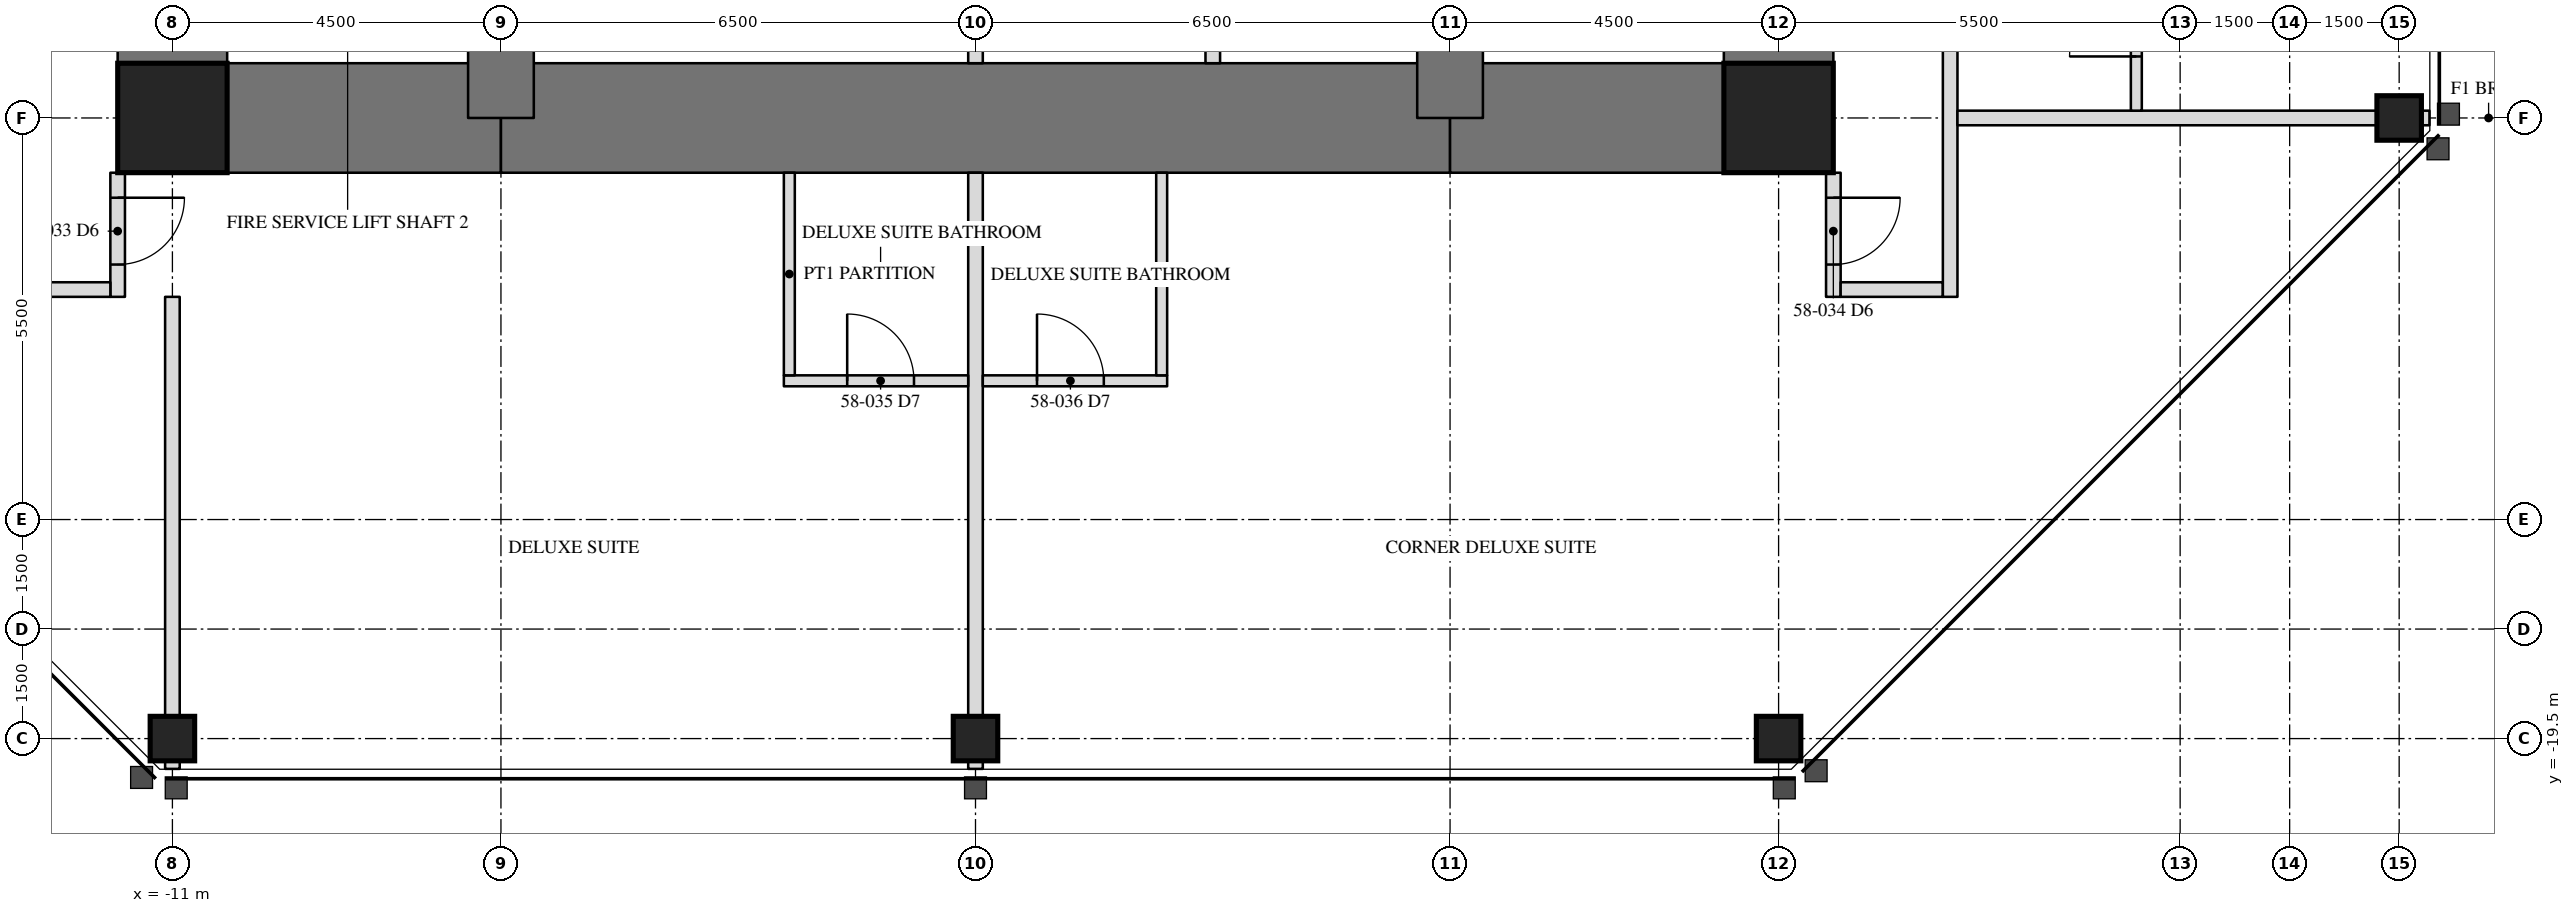
"""IFC4 building model, lengths in metres.
Left out: names, types, materials, properties, quantities, classifications, styles, units other than length and angle.
Written with IfcOpenShell. Run it as: python <this file> out.ifc"""

import sys

from ifc_helpers import new_model, si_unit, direction, frame, frame_2d, origin, origin_2d, place, context, subcontext, project, spatial, rectangle, hollow_rectangle, extrude, element, fill, save


model = new_model("IFC4")
c1 = context("Model", 3, precision=1e-05, world=origin(), true_north=direction((0.0, 1.0)))
c2 = subcontext(c1, "Body", "Model", "MODEL_VIEW")
j1 = project(units=[si_unit("LENGTHUNIT", "METRE"), si_unit("PLANEANGLEUNIT", "RADIAN")], contexts=[c1])
p1 = place(None, origin())
s1 = spatial("IfcSite", under=j1, at=p1, CompositionType="ELEMENT")
p2 = place(p1, origin())
s2 = spatial("IfcBuilding", under=s1, at=p2, CompositionType="ELEMENT")
p3 = place(p2, frame((0.0, 0.0, 239.7)))
s3 = spatial("IfcBuildingStorey", under=s2, at=p3, CompositionType="ELEMENT", Elevation=239.7)
for number, where, z_axis, x_axis in (
    (1, (-11.0, -19.5, 0.0), (0.0, 0.0, 1.0), (1.0, 0.0, 0.0)),
    (2, (0.0, -19.5, 0.0), (0.0, 0.0, 1.0), (1.0, 0.0, 0.0)),
    (3, (11.0, -19.5, 0.0), (0.0, 0.0, 1.0), (1.0, 0.0, 0.0)),
    (4, (19.5, -11.0, 0.0), (0.0, 0.0, 1.0), (0.0, 1.0, 0.0)),
):
    element("IfcColumn", number, at=place(p3, frame(where, z_axis=z_axis, x_axis=x_axis)), inside=s3, PredefinedType="COLUMN", context=c2, shape_type="SweptSolid", body=[
        extrude(hollow_rectangle(XDim=0.61, YDim=0.61, WallThickness=0.051, at=origin_2d()), origin(), (0.0, 0.0, 1.0), 3.5),
    ])
p4 = place(p3, frame((11.0, -11.0, 0.0), z_axis=(0.0, 0.0, 1.0), x_axis=(0.0, 1.0, 0.0)))
e5 = element("IfcWall", 5, at=p4, inside=s3, PredefinedType="SHEAR", context=c2, shape_type="SweptSolid", body=[
    extrude(rectangle(XDim=22.0, YDim=1.5, at=frame_2d((11.0, 0.0))), origin(), (0.0, 0.0, 1.0), 3.5),
])
p5 = place(p4, frame((15.393, 0.0, 0.0)))
e6 = element("IfcOpeningElement", 6, at=p5, cuts=e5, PredefinedType="OPENING", context=c2, shape_type="SweptSolid", body=[
    extrude(rectangle(XDim=0.915, YDim=2.134, at=frame_2d((0.458, 1.067))), frame((0.0, 0.76, 0.0), z_axis=(0.0, -1.0, 0.0), x_axis=(1.0, 0.0, 0.0)), (0.0, 0.0, 1.0), 1.52),
])
p6 = place(p3, frame((-11.0, 11.0, 0.0), z_axis=(0.0, 0.0, 1.0), x_axis=(0.0, -1.0, 0.0)))
e7 = element("IfcWall", 7, at=p6, inside=s3, PredefinedType="SHEAR", context=c2, shape_type="SweptSolid", body=[
    extrude(rectangle(XDim=22.0, YDim=1.5, at=frame_2d((11.0, 0.0))), origin(), (0.0, 0.0, 1.0), 3.5),
])
p7 = place(p6, frame((15.393, 0.0, 0.0)))
e8 = element("IfcOpeningElement", 8, at=p7, cuts=e7, PredefinedType="OPENING", context=c2, shape_type="SweptSolid", body=[
    extrude(rectangle(XDim=0.915, YDim=2.134, at=frame_2d((0.458, 1.067))), frame((0.0, 0.76, 0.0), z_axis=(0.0, -1.0, 0.0), x_axis=(1.0, 0.0, 0.0)), (0.0, 0.0, 1.0), 1.52),
])
p8 = place(p3, frame((-11.0, -11.0, 0.0), z_axis=(0.0, 0.0, 1.0), x_axis=(1.0, 0.0, 0.0)))
e9 = element("IfcWall", 9, at=p8, inside=s3, PredefinedType="SHEAR", context=c2, shape_type="SweptSolid", body=[
    extrude(rectangle(XDim=4.5, YDim=1.5, at=frame_2d((2.25, 0.0))), origin(), (0.0, 0.0, 1.0), 3.5),
])
p9 = place(p3, frame((-6.5, -11.0, 0.0), z_axis=(0.0, 0.0, 1.0), x_axis=(1.0, 0.0, 0.0)))
e10 = element("IfcWall", 10, at=p9, inside=s3, PredefinedType="SHEAR", context=c2, shape_type="SweptSolid", body=[
    extrude(rectangle(XDim=13.0, YDim=1.5, at=frame_2d((6.5, 0.0))), origin(), (0.0, 0.0, 1.0), 3.5),
])
p10 = place(p3, frame((6.5, -11.0, 0.0), z_axis=(0.0, 0.0, 1.0), x_axis=(1.0, 0.0, 0.0)))
e11 = element("IfcWall", 11, at=p10, inside=s3, PredefinedType="SHEAR", context=c2, shape_type="SweptSolid", body=[
    extrude(rectangle(XDim=4.5, YDim=1.5, at=frame_2d((2.25, 0.0))), origin(), (0.0, 0.0, 1.0), 3.5),
])
for number, where, z_axis, x_axis in (
    (12, (6.5, -11.0, 0.0), (0.0, 0.0, 1.0), (0.0, 1.0, 0.0)),
    (13, (-6.5, -6.5, 0.0), (0.0, 0.0, 1.0), (0.0, -1.0, 0.0)),
):
    element("IfcWall", number, at=place(p3, frame(where, z_axis=z_axis, x_axis=x_axis)), inside=s3, PredefinedType="SHEAR", context=c2, shape_type="SweptSolid", body=[
        extrude(rectangle(XDim=4.5, YDim=0.9, at=frame_2d((2.25, 0.0))), origin(), (0.0, 0.0, 1.0), 3.5),
    ])
for number, where, z_axis, x_axis in (
    (14, (-11.0, -11.0, 0.0), (0.0, 0.0, 1.0), (1.0, 0.0, 0.0)),
    (15, (11.0, -11.0, 0.0), (0.0, 0.0, 1.0), (1.0, 0.0, 0.0)),
):
    element("IfcColumn", number, at=place(p3, frame(where, z_axis=z_axis, x_axis=x_axis)), inside=s3, PredefinedType="COLUMN", context=c2, shape_type="SweptSolid", body=[
        extrude(hollow_rectangle(XDim=1.499, YDim=1.499, WallThickness=0.102, at=origin_2d()), origin(), (0.0, 0.0, 1.0), 3.5),
    ])
for number, where, z_axis, x_axis in (
    (16, (0.0, -10.25, 0.0), (0.0, 0.0, 1.0), (0.0, 1.0, 0.0)),
    (17, (3.25, -10.25, 0.0), (0.0, 0.0, 1.0), (0.0, 1.0, 0.0)),
):
    element("IfcWall", number, at=place(p3, frame(where, z_axis=z_axis, x_axis=x_axis)), inside=s3, PredefinedType="PARTITIONING", context=c2, shape_type="SweptSolid", body=[
        extrude(rectangle(XDim=3.3, YDim=0.2, at=frame_2d((1.65, 0.0))), origin(), (0.0, 0.0, 1.0), 3.31),
    ])
p11 = place(p3, frame((-11.75, -11.75, 0.0), z_axis=(0.0, 0.0, 1.0), x_axis=(0.0, -1.0, 0.0)))
e18 = element("IfcWall", 18, at=p11, inside=s3, PredefinedType="PARTITIONING", context=c2, shape_type="SweptSolid", body=[
    extrude(rectangle(XDim=1.7, YDim=0.2, at=frame_2d((0.85, 0.0))), origin(), (0.0, 0.0, 1.0), 3.31),
])
p12 = place(p11, frame((0.343, 0.0, 0.0)))
e19 = element("IfcOpeningElement", 19, at=p12, cuts=e18, PredefinedType="OPENING", context=c2, shape_type="SweptSolid", body=[
    extrude(rectangle(XDim=0.915, YDim=2.134, at=frame_2d((0.458, 1.067))), frame((0.0, 0.11, 0.0), z_axis=(0.0, -1.0, 0.0), x_axis=(1.0, 0.0, 0.0)), (0.0, 0.0, 1.0), 0.22),
])
p13 = place(p3, frame((11.75, -11.75, 0.0), z_axis=(0.0, 0.0, 1.0), x_axis=(0.0, -1.0, 0.0)))
e20 = element("IfcWall", 20, at=p13, inside=s3, PredefinedType="PARTITIONING", context=c2, shape_type="SweptSolid", body=[
    extrude(rectangle(XDim=1.7, YDim=0.2, at=frame_2d((0.85, 0.0))), origin(), (0.0, 0.0, 1.0), 3.31),
])
p14 = place(p13, frame((0.343, 0.0, 0.0)))
e21 = element("IfcOpeningElement", 21, at=p14, cuts=e20, PredefinedType="OPENING", context=c2, shape_type="SweptSolid", body=[
    extrude(rectangle(XDim=0.915, YDim=2.134, at=frame_2d((0.458, 1.067))), frame((0.0, 0.11, 0.0), z_axis=(0.0, -1.0, 0.0), x_axis=(1.0, 0.0, 0.0)), (0.0, 0.0, 1.0), 0.22),
])
p15 = place(p3, frame((-13.45, -13.35, 0.0), z_axis=(0.0, 0.0, 1.0), x_axis=(1.0, 0.0, 0.0)))
e22 = element("IfcWall", 22, at=p15, inside=s3, PredefinedType="PARTITIONING", context=c2, shape_type="SweptSolid", body=[
    extrude(rectangle(XDim=1.6, YDim=0.2, at=frame_2d((0.8, 0.0))), origin(), (0.0, 0.0, 1.0), 3.31),
])
p16 = place(p3, frame((11.85, -13.35, 0.0), z_axis=(0.0, 0.0, 1.0), x_axis=(1.0, 0.0, 0.0)))
e23 = element("IfcWall", 23, at=p16, inside=s3, PredefinedType="PARTITIONING", context=c2, shape_type="SweptSolid", body=[
    extrude(rectangle(XDim=1.4, YDim=0.2, at=frame_2d((0.7, 0.0))), origin(), (0.0, 0.0, 1.0), 3.31),
])
p17 = place(p3, frame((13.35, -13.45, 0.0), z_axis=(0.0, 0.0, 1.0), x_axis=(0.0, 1.0, 0.0)))
e24 = element("IfcWall", 24, at=p17, inside=s3, PredefinedType="PARTITIONING", context=c2, shape_type="SweptSolid", body=[
    extrude(rectangle(XDim=27.5, YDim=0.2, at=frame_2d((13.75, 0.0))), origin(), (0.0, 0.0, 1.0), 3.31),
])
p18 = place(p17, frame((5.353, 0.0, 0.0)))
e25 = element("IfcOpeningElement", 25, at=p18, cuts=e24, PredefinedType="OPENING", context=c2, shape_type="SweptSolid", body=[
    extrude(rectangle(XDim=0.915, YDim=2.134, at=frame_2d((0.458, 1.067))), frame((0.0, 0.11, 0.0), z_axis=(0.0, -1.0, 0.0), x_axis=(1.0, 0.0, 0.0)), (0.0, 0.0, 1.0), 0.22),
])
p19 = place(p17, frame((13.577, 0.0, 0.0)))
e26 = element("IfcOpeningElement", 26, at=p19, cuts=e24, PredefinedType="OPENING", context=c2, shape_type="SweptSolid", body=[
    extrude(rectangle(XDim=0.915, YDim=2.134, at=frame_2d((0.458, 1.067))), frame((0.0, 0.11, 0.0), z_axis=(0.0, -1.0, 0.0), x_axis=(1.0, 0.0, 0.0)), (0.0, 0.0, 1.0), 0.22),
])
p20 = place(p17, frame((21.967, 0.0, 0.0)))
e27 = element("IfcOpeningElement", 27, at=p20, cuts=e24, PredefinedType="OPENING", context=c2, shape_type="SweptSolid", body=[
    extrude(rectangle(XDim=0.915, YDim=2.134, at=frame_2d((0.458, 1.067))), frame((0.0, 0.11, 0.0), z_axis=(0.0, -1.0, 0.0), x_axis=(1.0, 0.0, 0.0)), (0.0, 0.0, 1.0), 0.22),
])
p21 = place(p3, frame((13.45, -11.0, 0.0), z_axis=(0.0, 0.0, 1.0), x_axis=(1.0, 0.0, 0.0)))
e28 = element("IfcWall", 28, at=p21, inside=s3, PredefinedType="PARTITIONING", context=c2, shape_type="SweptSolid", body=[
    extrude(rectangle(XDim=6.465, YDim=0.2, at=frame_2d((3.232, 0.0))), origin(), (0.0, 0.0, 1.0), 2.802),
])
p22 = place(p3, frame((15.9, -10.9, 0.0), z_axis=(0.0, 0.0, 1.0), x_axis=(0.0, 1.0, 0.0)))
e29 = element("IfcWall", 29, at=p22, inside=s3, PredefinedType="PARTITIONING", context=c2, shape_type="SweptSolid", body=[
    extrude(rectangle(XDim=2.525, YDim=0.15, at=frame_2d((1.262, 0.0))), origin(), (0.0, 0.0, 1.0), 3.31),
])
p23 = place(p22, frame((0.742, 0.0, 0.0)))
e30 = element("IfcOpeningElement", 30, at=p23, cuts=e29, PredefinedType="OPENING", context=c2, shape_type="SweptSolid", body=[
    extrude(rectangle(XDim=0.915, YDim=2.032, at=frame_2d((0.458, 1.016))), frame((0.0, 0.085, 0.0), z_axis=(0.0, -1.0, 0.0), x_axis=(1.0, 0.0, 0.0)), (0.0, 0.0, 1.0), 0.17),
])
p24 = place(p3, frame((-11.0, -13.45, 0.0), z_axis=(0.0, 0.0, 1.0), x_axis=(0.0, -1.0, 0.0)))
e31 = element("IfcWall", 31, at=p24, inside=s3, PredefinedType="PARTITIONING", context=c2, shape_type="SweptSolid", body=[
    extrude(rectangle(XDim=6.465, YDim=0.2, at=frame_2d((3.232, 0.0))), origin(), (0.0, 0.0, 1.0), 2.802),
])
p25 = place(p3, frame((0.0, -11.75, 0.0), z_axis=(0.0, 0.0, 1.0), x_axis=(0.0, -1.0, 0.0)))
e32 = element("IfcWall", 32, at=p25, inside=s3, PredefinedType="PARTITIONING", context=c2, shape_type="SweptSolid", body=[
    extrude(rectangle(XDim=8.165, YDim=0.2, at=frame_2d((4.083, 0.0))), origin(), (0.0, 0.0, 1.0), 2.802),
])
p26 = place(p3, frame((-2.625, -14.6, 0.0), z_axis=(0.0, 0.0, 1.0), x_axis=(1.0, 0.0, 0.0)))
e33 = element("IfcWall", 33, at=p26, inside=s3, PredefinedType="PARTITIONING", context=c2, shape_type="SweptSolid", body=[
    extrude(rectangle(XDim=2.525, YDim=0.15, at=frame_2d((1.262, 0.0))), origin(), (0.0, 0.0, 1.0), 3.31),
])
p27 = place(p26, frame((0.867, 0.0, 0.0)))
e34 = element("IfcOpeningElement", 34, at=p27, cuts=e33, PredefinedType="OPENING", context=c2, shape_type="SweptSolid", body=[
    extrude(rectangle(XDim=0.915, YDim=2.032, at=frame_2d((0.458, 1.016))), frame((0.0, 0.085, 0.0), z_axis=(0.0, -1.0, 0.0), x_axis=(1.0, 0.0, 0.0)), (0.0, 0.0, 1.0), 0.17),
])
p28 = place(p3, frame((-2.55, -11.75, 0.0), z_axis=(0.0, 0.0, 1.0), x_axis=(0.0, -1.0, 0.0)))
e35 = element("IfcWall", 35, at=p28, inside=s3, PredefinedType="PARTITIONING", context=c2, shape_type="SweptSolid", body=[
    extrude(rectangle(XDim=2.775, YDim=0.15, at=frame_2d((1.387, 0.0))), origin(), (0.0, 0.0, 1.0), 3.31),
])
p29 = place(p3, frame((0.1, -14.6, 0.0), z_axis=(0.0, 0.0, 1.0), x_axis=(1.0, 0.0, 0.0)))
e36 = element("IfcWall", 36, at=p29, inside=s3, PredefinedType="PARTITIONING", context=c2, shape_type="SweptSolid", body=[
    extrude(rectangle(XDim=2.525, YDim=0.15, at=frame_2d((1.262, 0.0))), origin(), (0.0, 0.0, 1.0), 3.31),
])
p30 = place(p29, frame((0.742, 0.0, 0.0)))
e37 = element("IfcOpeningElement", 37, at=p30, cuts=e36, PredefinedType="OPENING", context=c2, shape_type="SweptSolid", body=[
    extrude(rectangle(XDim=0.915, YDim=2.032, at=frame_2d((0.458, 1.016))), frame((0.0, 0.085, 0.0), z_axis=(0.0, -1.0, 0.0), x_axis=(1.0, 0.0, 0.0)), (0.0, 0.0, 1.0), 0.17),
])
p31 = place(p3, frame((2.55, -11.75, 0.0), z_axis=(0.0, 0.0, 1.0), x_axis=(0.0, -1.0, 0.0)))
e38 = element("IfcWall", 38, at=p31, inside=s3, PredefinedType="PARTITIONING", context=c2, shape_type="SweptSolid", body=[
    extrude(rectangle(XDim=2.775, YDim=0.15, at=frame_2d((1.387, 0.0))), origin(), (0.0, 0.0, 1.0), 3.31),
])
p32 = place(p23, origin())
e39 = element("IfcDoor", 39, at=p32, inside=s3, OperationType="SINGLE_SWING_LEFT", PredefinedType="DOOR", context=c2, shape_type="SweptSolid", body=[
    extrude(rectangle(XDim=0.915, YDim=2.032, at=frame_2d((0.458, 1.016))), frame((0.0, 0.025, 0.0), z_axis=(0.0, -1.0, 0.0), x_axis=(1.0, 0.0, 0.0)), (0.0, 0.0, 1.0), 0.05),
])
fill(e30, e39)
p33 = place(p12, origin())
e40 = element("IfcDoor", 40, at=p33, inside=s3, OperationType="SINGLE_SWING_LEFT", PredefinedType="DOOR", context=c2, shape_type="SweptSolid", body=[
    extrude(rectangle(XDim=0.915, YDim=2.134, at=frame_2d((0.458, 1.067))), frame((0.0, 0.025, 0.0), z_axis=(0.0, -1.0, 0.0), x_axis=(1.0, 0.0, 0.0)), (0.0, 0.0, 1.0), 0.05),
])
fill(e19, e40)
p34 = place(p14, origin())
e41 = element("IfcDoor", 41, at=p34, inside=s3, OperationType="SINGLE_SWING_LEFT", PredefinedType="DOOR", context=c2, shape_type="SweptSolid", body=[
    extrude(rectangle(XDim=0.915, YDim=2.134, at=frame_2d((0.458, 1.067))), frame((0.0, 0.025, 0.0), z_axis=(0.0, -1.0, 0.0), x_axis=(1.0, 0.0, 0.0)), (0.0, 0.0, 1.0), 0.05),
])
fill(e21, e41)
p35 = place(p27, origin())
e42 = element("IfcDoor", 42, at=p35, inside=s3, OperationType="SINGLE_SWING_LEFT", PredefinedType="DOOR", context=c2, shape_type="SweptSolid", body=[
    extrude(rectangle(XDim=0.915, YDim=2.032, at=frame_2d((0.458, 1.016))), frame((0.0, 0.025, 0.0), z_axis=(0.0, -1.0, 0.0), x_axis=(1.0, 0.0, 0.0)), (0.0, 0.0, 1.0), 0.05),
])
fill(e34, e42)
p36 = place(p30, origin())
e43 = element("IfcDoor", 43, at=p36, inside=s3, OperationType="SINGLE_SWING_LEFT", PredefinedType="DOOR", context=c2, shape_type="SweptSolid", body=[
    extrude(rectangle(XDim=0.915, YDim=2.032, at=frame_2d((0.458, 1.016))), frame((0.0, 0.025, 0.0), z_axis=(0.0, -1.0, 0.0), x_axis=(1.0, 0.0, 0.0)), (0.0, 0.0, 1.0), 0.05),
])
fill(e37, e43)
save(model, sys.argv[1])
